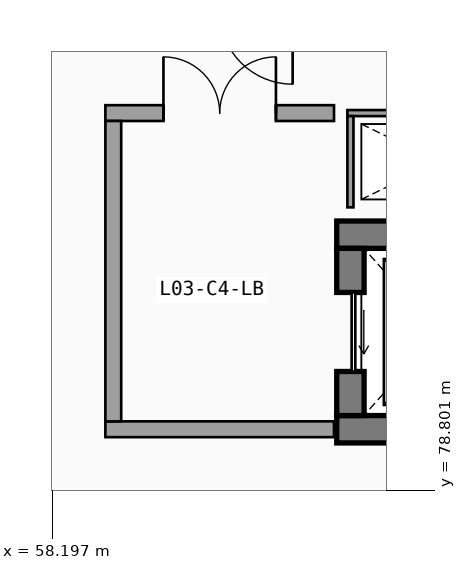
"""IFC4 building model, lengths in metres.
Left out: names, types, materials, properties, quantities, classifications, styles, units other than length and angle.
Written with IfcOpenShell. Run it as: python <this file> out.ifc"""

import sys

from ifc_helpers import new_model, si_unit, direction, frame, frame_2d, origin, place, context, subcontext, project, spatial, rectangle, extrude, element, fill, save


model = new_model("IFC4")
c1 = context("Model", 3, precision=1e-05, world=origin(), true_north=direction((0.0, 1.0)))
c2 = subcontext(c1, "Body", "Model", "MODEL_VIEW")
j1 = project(units=[si_unit("LENGTHUNIT", "METRE"), si_unit("PLANEANGLEUNIT", "RADIAN")], contexts=[c1])
p1 = place(None, origin())
s1 = spatial("IfcSite", under=j1, at=p1, CompositionType="ELEMENT")
p2 = place(p1, origin())
s2 = spatial("IfcBuilding", under=s1, at=p2, CompositionType="ELEMENT")
p3 = place(p2, frame((0.0, 0.0, 14.1)))
s3 = spatial("IfcBuildingStorey", under=s2, at=p3, CompositionType="ELEMENT", Elevation=14.1)
for number, where, z_axis, x_axis in (
    (1, (62.875, 79.8, 0.0), (0.0, 0.0, 1.0), (1.0, 0.0, 0.0)),
    (2, (66.225, 83.0, 0.0), (0.0, 0.0, 1.0), (-1.0, 0.0, 0.0)),
):
    element("IfcWall", number, at=place(p3, frame(where, z_axis=z_axis, x_axis=x_axis)), inside=s3, PredefinedType="SHEAR", context=c2, shape_type="SweptSolid", body=[
        extrude(rectangle(XDim=3.35, YDim=0.45, at=frame_2d((1.675, 0.0))), origin(), (0.0, 0.0, 1.0), 4.24),
    ])
p4 = place(p3, frame((63.1, 82.775, 0.0), z_axis=(0.0, 0.0, 1.0), x_axis=(0.0, -1.0, 0.0)))
e3 = element("IfcWall", 3, at=p4, inside=s3, PredefinedType="SHEAR", context=c2, shape_type="SweptSolid", body=[
    extrude(rectangle(XDim=2.75, YDim=0.45, at=frame_2d((1.375, 0.0))), origin(), (0.0, 0.0, 1.0), 4.24),
])
p5 = place(p4, frame((0.725, 0.0, 0.0), z_axis=(0.0, 0.0, 1.0), x_axis=(1.0, 0.0, 0.0)))
e4 = element("IfcOpeningElement", 4, at=p5, cuts=e3, PredefinedType="OPENING", context=c2, shape_type="SweptSolid", body=[
    extrude(rectangle(XDim=1.3, YDim=2.25, at=frame_2d((0.65, 1.125))), frame((0.0, 0.235, 0.0), z_axis=(0.0, -1.0, 0.0), x_axis=(1.0, 0.0, 0.0)), (0.0, 0.0, 1.0), 0.47),
])
p6 = place(p3, frame((66.05, 85.0, 0.0), z_axis=(0.0, 0.0, 1.0), x_axis=(-1.0, 0.0, 0.0)))
e5 = element("IfcWall", 5, at=p6, inside=s3, PredefinedType="PARTITIONING", context=c2, shape_type="SweptSolid", body=[
    extrude(rectangle(XDim=3.0, YDim=0.1, at=frame_2d((1.5, 0.0))), origin(), (0.0, 0.0, 1.0), 4.24),
])
p7 = place(p3, frame((63.1, 84.95, 0.0), z_axis=(0.0, 0.0, 1.0), x_axis=(0.0, -1.0, 0.0)))
e6 = element("IfcWall", 6, at=p7, inside=s3, PredefinedType="PARTITIONING", context=c2, shape_type="SweptSolid", body=[
    extrude(rectangle(XDim=1.5, YDim=0.1, at=frame_2d((0.75, 0.0))), origin(), (0.0, 0.0, 1.0), 4.24),
])
p8 = place(p3, frame((59.07, 79.8, 0.0), z_axis=(0.0, 0.0, 1.0), x_axis=(1.0, 0.0, 0.0)))
e7 = element("IfcWall", 7, at=p8, inside=s3, PredefinedType="SOLIDWALL", context=c2, shape_type="SweptSolid", body=[
    extrude(rectangle(XDim=3.76, YDim=0.26, at=frame_2d((1.88, 0.0))), origin(), (0.0, 0.0, 1.0), 4.24),
])
p9 = place(p3, frame((62.83, 85.0, 0.0), z_axis=(0.0, 0.0, 1.0), x_axis=(-1.0, 0.0, 0.0)))
e8 = element("IfcWall", 8, at=p9, inside=s3, PredefinedType="SOLIDWALL", context=c2, shape_type="SweptSolid", body=[
    extrude(rectangle(XDim=3.76, YDim=0.26, at=frame_2d((1.88, 0.0))), origin(), (0.0, 0.0, 1.0), 4.24),
])
p10 = place(p9, frame((2.805, 0.0, 0.0), z_axis=(0.0, 0.0, 1.0), x_axis=(-1.0, 0.0, 0.0)))
e9 = element("IfcOpeningElement", 9, at=p10, cuts=e8, PredefinedType="OPENING", context=c2, shape_type="SweptSolid", body=[
    extrude(rectangle(XDim=1.85, YDim=2.25, at=frame_2d((0.925, 1.125))), frame((0.0, 0.14, 0.0), z_axis=(0.0, -1.0, 0.0), x_axis=(1.0, 0.0, 0.0)), (0.0, 0.0, 1.0), 0.28),
])
p11 = place(p3, frame((59.2, 84.87, 0.0), z_axis=(0.0, 0.0, 1.0), x_axis=(0.0, -1.0, 0.0)))
e10 = element("IfcWall", 10, at=p11, inside=s3, PredefinedType="SOLIDWALL", context=c2, shape_type="SweptSolid", body=[
    extrude(rectangle(XDim=4.94, YDim=0.26, at=frame_2d((2.47, 0.0))), origin(), (0.0, 0.0, 1.0), 4.24),
])
p12 = place(p5, origin())
e11 = element("IfcDoor", 11, at=p12, inside=s3, OperationType="SLIDING_TO_RIGHT", PredefinedType="DOOR", context=c2, shape_type="SweptSolid", body=[
    extrude(rectangle(XDim=1.3, YDim=2.25, at=frame_2d((0.65, 1.125))), frame((0.0, 0.025, 0.0), z_axis=(0.0, -1.0, 0.0), x_axis=(1.0, 0.0, 0.0)), (0.0, 0.0, 1.0), 0.05),
])
fill(e4, e11)
p13 = place(p10, origin())
e12 = element("IfcDoor", 12, at=p13, inside=s3, OperationType="DOUBLE_DOOR_SINGLE_SWING", PredefinedType="DOOR", context=c2, shape_type="SweptSolid", body=[
    extrude(rectangle(XDim=1.85, YDim=2.25, at=frame_2d((0.925, 1.125))), frame((0.0, 0.025, 0.0), z_axis=(0.0, -1.0, 0.0), x_axis=(1.0, 0.0, 0.0)), (0.0, 0.0, 1.0), 0.05),
])
fill(e9, e12)
save(model, sys.argv[1])
